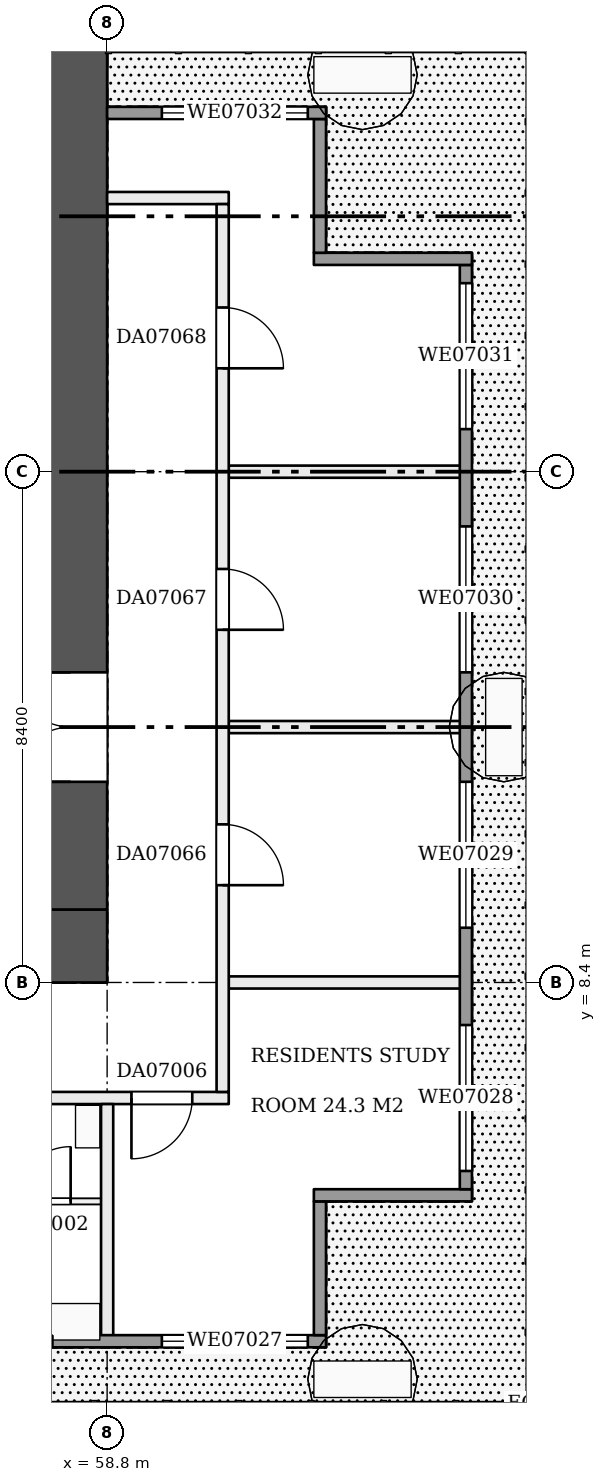
"""IFC4 building model, lengths in metres.
Left out: names, types, materials, properties, quantities, classifications, styles, units other than length and angle.
Written with IfcOpenShell. Run it as: python <this file> out.ifc"""

import sys

from ifc_helpers import new_model, si_unit, direction, frame, frame_2d, origin, place, context, subcontext, project, spatial, rectangle, extrude, element, fill, save


model = new_model("IFC4")
c1 = context("Model", 3, precision=1e-05, world=origin(), true_north=direction((0.0, 1.0)))
c2 = subcontext(c1, "Body", "Model", "MODEL_VIEW")
j1 = project(units=[si_unit("LENGTHUNIT", "METRE"), si_unit("PLANEANGLEUNIT", "RADIAN")], contexts=[c1])
p1 = place(None, origin())
s1 = spatial("IfcSite", under=j1, at=p1, CompositionType="ELEMENT")
p2 = place(p1, origin())
s2 = spatial("IfcBuilding", under=s1, at=p2, CompositionType="ELEMENT")
p3 = place(p2, frame((0.0, 0.0, 35.7)))
s3 = spatial("IfcBuildingStorey", under=s2, at=p3, CompositionType="ELEMENT", Elevation=35.7)
p4 = place(p3, frame((42.0, 9.0, 0.0), z_axis=(0.0, 0.0, 1.0), x_axis=(1.0, 0.0, 0.0)))
e1 = element("IfcWall", 1, at=p4, inside=s3, PredefinedType="SHEAR", context=c2, shape_type="SweptSolid", body=[
    extrude(rectangle(XDim=16.8, YDim=1.2, at=frame_2d((8.4, 0.0))), origin(), (0.0, 0.0, 1.0), 3.22),
])
p5 = place(p4, frame((3.1, 0.0, 0.0)))
e2 = element("IfcOpeningElement", 2, at=p5, cuts=e1, PredefinedType="OPENING", context=c2, shape_type="SweptSolid", body=[
    extrude(rectangle(XDim=1.0, YDim=2.1, at=frame_2d((0.5, 1.05))), frame((0.0, 0.61, 0.0), z_axis=(0.0, -1.0, 0.0), x_axis=(1.0, 0.0, 0.0)), (0.0, 0.0, 1.0), 1.22),
])
p6 = place(p4, frame((12.7, 0.0, 0.0)))
e3 = element("IfcOpeningElement", 3, at=p6, cuts=e1, PredefinedType="OPENING", context=c2, shape_type="SweptSolid", body=[
    extrude(rectangle(XDim=1.0, YDim=2.1, at=frame_2d((0.5, 1.05))), frame((0.0, 0.61, 0.0), z_axis=(0.0, -1.0, 0.0), x_axis=(1.0, 0.0, 0.0)), (0.0, 0.0, 1.0), 1.22),
])
p7 = place(p3, frame((58.2, 9.6, 0.0), z_axis=(0.0, 0.0, 1.0), x_axis=(0.0, 1.0, 0.0)))
e4 = element("IfcWall", 4, at=p7, inside=s3, PredefinedType="SHEAR", context=c2, shape_type="SweptSolid", body=[
    extrude(rectangle(XDim=14.4, YDim=1.2, at=frame_2d((7.2, 0.0))), origin(), (0.0, 0.0, 1.0), 3.22),
])
p8 = place(p7, frame((2.1, 0.0, 0.0)))
e5 = element("IfcOpeningElement", 5, at=p8, cuts=e4, PredefinedType="OPENING", context=c2, shape_type="SweptSolid", body=[
    extrude(rectangle(XDim=1.8, YDim=2.1, at=frame_2d((0.9, 1.05))), frame((0.0, 0.61, 0.0), z_axis=(0.0, -1.0, 0.0), x_axis=(1.0, 0.0, 0.0)), (0.0, 0.0, 1.0), 1.22),
])
p9 = place(p3, frame((54.65, 4.8, 0.0), z_axis=(0.0, 0.0, 1.0), x_axis=(1.0, 0.0, 0.0)))
e6 = element("IfcWall", 6, at=p9, inside=s3, PredefinedType="PARTITIONING", context=c2, shape_type="SweptSolid", body=[
    extrude(rectangle(XDim=4.05, YDim=0.1, at=frame_2d((2.025, 0.0))), origin(), (0.0, 0.0, 1.0), 3.22),
])
p10 = place(p9, frame((0.55, 0.0, 0.0)))
e7 = element("IfcOpeningElement", 7, at=p10, cuts=e6, PredefinedType="OPENING", context=c2, shape_type="SweptSolid", body=[
    extrude(rectangle(XDim=0.9, YDim=2.1, at=frame_2d((0.45, 1.05))), frame((0.0, 0.06, 0.0), z_axis=(0.0, -1.0, 0.0), x_axis=(1.0, 0.0, 0.0)), (0.0, 0.0, 1.0), 0.12),
])
p11 = place(p9, frame((2.65, 0.0, 0.0)))
e8 = element("IfcOpeningElement", 8, at=p11, cuts=e6, PredefinedType="OPENING", context=c2, shape_type="SweptSolid", body=[
    extrude(rectangle(XDim=0.9, YDim=2.1, at=frame_2d((0.45, 1.05))), frame((0.0, 0.06, 0.0), z_axis=(0.0, -1.0, 0.0), x_axis=(1.0, 0.0, 0.0)), (0.0, 0.0, 1.0), 0.12),
])
p12 = place(p3, frame((42.1, 6.5, 0.0), z_axis=(0.0, 0.0, 1.0), x_axis=(1.0, 0.0, 0.0)))
e9 = element("IfcWall", 9, at=p12, inside=s3, PredefinedType="PARTITIONING", context=c2, shape_type="SweptSolid", body=[
    extrude(rectangle(XDim=18.7, YDim=0.2, at=frame_2d((9.35, 0.0))), origin(), (0.0, 0.0, 1.0), 3.22),
])
p13 = place(p12, frame((1.5, 0.0, 0.0)))
e10 = element("IfcOpeningElement", 10, at=p13, cuts=e9, PredefinedType="OPENING", context=c2, shape_type="SweptSolid", body=[
    extrude(rectangle(XDim=1.0, YDim=2.1, at=frame_2d((0.5, 1.05))), frame((0.0, 0.11, 0.0), z_axis=(0.0, -1.0, 0.0), x_axis=(1.0, 0.0, 0.0)), (0.0, 0.0, 1.0), 0.22),
])
p14 = place(p12, frame((5.7, 0.0, 0.0)))
e11 = element("IfcOpeningElement", 11, at=p14, cuts=e9, PredefinedType="OPENING", context=c2, shape_type="SweptSolid", body=[
    extrude(rectangle(XDim=1.0, YDim=2.1, at=frame_2d((0.5, 1.05))), frame((0.0, 0.11, 0.0), z_axis=(0.0, -1.0, 0.0), x_axis=(1.0, 0.0, 0.0)), (0.0, 0.0, 1.0), 0.22),
])
p15 = place(p12, frame((13.1, 0.0, 0.0)))
e12 = element("IfcOpeningElement", 12, at=p15, cuts=e9, PredefinedType="OPENING", context=c2, shape_type="SweptSolid", body=[
    extrude(rectangle(XDim=1.0, YDim=2.1, at=frame_2d((0.5, 1.05))), frame((0.0, 0.11, 0.0), z_axis=(0.0, -1.0, 0.0), x_axis=(1.0, 0.0, 0.0)), (0.0, 0.0, 1.0), 0.22),
])
p16 = place(p12, frame((17.1, 0.0, 0.0)))
e13 = element("IfcOpeningElement", 13, at=p16, cuts=e9, PredefinedType="OPENING", context=c2, shape_type="SweptSolid", body=[
    extrude(rectangle(XDim=1.0, YDim=2.1, at=frame_2d((0.5, 1.05))), frame((0.0, 0.11, 0.0), z_axis=(0.0, -1.0, 0.0), x_axis=(1.0, 0.0, 0.0)), (0.0, 0.0, 1.0), 0.22),
])
for number, where, z_axis, x_axis in (
    (14, (60.8, 8.4, 0.0), (0.0, 0.0, 1.0), (1.0, 0.0, 0.0)),
    (15, (60.8, 12.6, 0.0), (0.0, 0.0, 1.0), (1.0, 0.0, 0.0)),
    (16, (60.8, 16.8, 0.0), (0.0, 0.0, 1.0), (1.0, 0.0, 0.0)),
):
    element("IfcWall", number, at=place(p3, frame(where, z_axis=z_axis, x_axis=x_axis)), inside=s3, PredefinedType="PARTITIONING", context=c2, shape_type="SweptSolid", body=[
        extrude(rectangle(XDim=3.9, YDim=0.2, at=frame_2d((1.95, 0.0))), origin(), (0.0, 0.0, 1.0), 3.22),
    ])
p17 = place(p3, frame((58.8, 21.3, 0.0), z_axis=(0.0, 0.0, 1.0), x_axis=(1.0, 0.0, 0.0)))
e17 = element("IfcWall", 17, at=p17, inside=s3, PredefinedType="PARTITIONING", context=c2, shape_type="SweptSolid", body=[
    extrude(rectangle(XDim=2.0, YDim=0.2, at=frame_2d((1.0, 0.0))), origin(), (0.0, 0.0, 1.0), 3.22),
])
p18 = place(p3, frame((58.8, 2.5, 0.0), z_axis=(0.0, 0.0, 1.0), x_axis=(0.0, 1.0, 0.0)))
e18 = element("IfcWall", 18, at=p18, inside=s3, PredefinedType="PARTITIONING", context=c2, shape_type="SweptSolid", body=[
    extrude(rectangle(XDim=3.9, YDim=0.2, at=frame_2d((1.95, 0.0))), origin(), (0.0, 0.0, 1.0), 3.22),
])
p19 = place(p3, frame((60.7, 6.6, 0.0), z_axis=(0.0, 0.0, 1.0), x_axis=(0.0, 1.0, 0.0)))
e19 = element("IfcWall", 19, at=p19, inside=s3, PredefinedType="PARTITIONING", context=c2, shape_type="SweptSolid", body=[
    extrude(rectangle(XDim=14.6, YDim=0.2, at=frame_2d((7.3, 0.0))), origin(), (0.0, 0.0, 1.0), 3.22),
])
p20 = place(p19, frame((3.4, 0.0, 0.0)))
e20 = element("IfcOpeningElement", 20, at=p20, cuts=e19, PredefinedType="OPENING", context=c2, shape_type="SweptSolid", body=[
    extrude(rectangle(XDim=1.0, YDim=2.1, at=frame_2d((0.5, 1.05))), frame((0.0, 0.11, 0.0), z_axis=(0.0, -1.0, 0.0), x_axis=(1.0, 0.0, 0.0)), (0.0, 0.0, 1.0), 0.22),
])
p21 = place(p19, frame((7.6, 0.0, 0.0)))
e21 = element("IfcOpeningElement", 21, at=p21, cuts=e19, PredefinedType="OPENING", context=c2, shape_type="SweptSolid", body=[
    extrude(rectangle(XDim=1.0, YDim=2.1, at=frame_2d((0.5, 1.05))), frame((0.0, 0.11, 0.0), z_axis=(0.0, -1.0, 0.0), x_axis=(1.0, 0.0, 0.0)), (0.0, 0.0, 1.0), 0.22),
])
p22 = place(p19, frame((11.9, 0.0, 0.0)))
e22 = element("IfcOpeningElement", 22, at=p22, cuts=e19, PredefinedType="OPENING", context=c2, shape_type="SweptSolid", body=[
    extrude(rectangle(XDim=1.0, YDim=2.1, at=frame_2d((0.5, 1.05))), frame((0.0, 0.11, 0.0), z_axis=(0.0, -1.0, 0.0), x_axis=(1.0, 0.0, 0.0)), (0.0, 0.0, 1.0), 0.22),
])
p23 = place(p3, frame((4.8, 2.5, 0.0), z_axis=(0.0, 0.0, 1.0), x_axis=(1.0, 0.0, 0.0)))
e23 = element("IfcWall", 23, at=p23, inside=s3, PredefinedType="SOLIDWALL", context=c2, shape_type="SweptSolid", body=[
    extrude(rectangle(XDim=57.6, YDim=0.2, at=frame_2d((28.8, 0.0))), origin(), (0.0, 0.0, 1.0), 3.22),
])
p24 = place(p23, frame((0.3, 0.0, 0.0)))
e24 = element("IfcOpeningElement", 24, at=p24, cuts=e23, PredefinedType="OPENING", context=c2, shape_type="SweptSolid", body=[
    extrude(rectangle(XDim=2.4, YDim=2.2, at=frame_2d((1.2, 1.1))), frame((0.0, 0.11, 0.0), z_axis=(0.0, -1.0, 0.0), x_axis=(1.0, 0.0, 0.0)), (0.0, 0.0, 1.0), 0.22),
])
p25 = place(p23, frame((4.5, 0.0, 0.9)))
e25 = element("IfcOpeningElement", 25, at=p25, cuts=e23, PredefinedType="OPENING", context=c2, shape_type="SweptSolid", body=[
    extrude(rectangle(XDim=2.4, YDim=1.5, at=frame_2d((1.2, 0.75))), frame((0.0, 0.11, 0.0), z_axis=(0.0, -1.0, 0.0), x_axis=(1.0, 0.0, 0.0)), (0.0, 0.0, 1.0), 0.22),
])
p26 = place(p23, frame((8.7, 0.0, 0.9)))
e26 = element("IfcOpeningElement", 26, at=p26, cuts=e23, PredefinedType="OPENING", context=c2, shape_type="SweptSolid", body=[
    extrude(rectangle(XDim=2.4, YDim=1.5, at=frame_2d((1.2, 0.75))), frame((0.0, 0.11, 0.0), z_axis=(0.0, -1.0, 0.0), x_axis=(1.0, 0.0, 0.0)), (0.0, 0.0, 1.0), 0.22),
])
p27 = place(p23, frame((12.9, 0.0, 0.9)))
e27 = element("IfcOpeningElement", 27, at=p27, cuts=e23, PredefinedType="OPENING", context=c2, shape_type="SweptSolid", body=[
    extrude(rectangle(XDim=2.4, YDim=1.5, at=frame_2d((1.2, 0.75))), frame((0.0, 0.11, 0.0), z_axis=(0.0, -1.0, 0.0), x_axis=(1.0, 0.0, 0.0)), (0.0, 0.0, 1.0), 0.22),
])
p28 = place(p23, frame((17.1, 0.0, 0.0)))
e28 = element("IfcOpeningElement", 28, at=p28, cuts=e23, PredefinedType="OPENING", context=c2, shape_type="SweptSolid", body=[
    extrude(rectangle(XDim=2.4, YDim=2.2, at=frame_2d((1.2, 1.1))), frame((0.0, 0.11, 0.0), z_axis=(0.0, -1.0, 0.0), x_axis=(1.0, 0.0, 0.0)), (0.0, 0.0, 1.0), 0.22),
])
p29 = place(p23, frame((21.3, 0.0, 0.0)))
e29 = element("IfcOpeningElement", 29, at=p29, cuts=e23, PredefinedType="OPENING", context=c2, shape_type="SweptSolid", body=[
    extrude(rectangle(XDim=2.4, YDim=2.2, at=frame_2d((1.2, 1.1))), frame((0.0, 0.11, 0.0), z_axis=(0.0, -1.0, 0.0), x_axis=(1.0, 0.0, 0.0)), (0.0, 0.0, 1.0), 0.22),
])
p30 = place(p23, frame((25.5, 0.0, 0.9)))
e30 = element("IfcOpeningElement", 30, at=p30, cuts=e23, PredefinedType="OPENING", context=c2, shape_type="SweptSolid", body=[
    extrude(rectangle(XDim=2.4, YDim=1.5, at=frame_2d((1.2, 0.75))), frame((0.0, 0.11, 0.0), z_axis=(0.0, -1.0, 0.0), x_axis=(1.0, 0.0, 0.0)), (0.0, 0.0, 1.0), 0.22),
])
p31 = place(p23, frame((29.7, 0.0, 0.0)))
e31 = element("IfcOpeningElement", 31, at=p31, cuts=e23, PredefinedType="OPENING", context=c2, shape_type="SweptSolid", body=[
    extrude(rectangle(XDim=2.4, YDim=2.2, at=frame_2d((1.2, 1.1))), frame((0.0, 0.11, 0.0), z_axis=(0.0, -1.0, 0.0), x_axis=(1.0, 0.0, 0.0)), (0.0, 0.0, 1.0), 0.22),
])
p32 = place(p23, frame((33.9, 0.0, 0.9)))
e32 = element("IfcOpeningElement", 32, at=p32, cuts=e23, PredefinedType="OPENING", context=c2, shape_type="SweptSolid", body=[
    extrude(rectangle(XDim=2.4, YDim=1.5, at=frame_2d((1.2, 0.75))), frame((0.0, 0.11, 0.0), z_axis=(0.0, -1.0, 0.0), x_axis=(1.0, 0.0, 0.0)), (0.0, 0.0, 1.0), 0.22),
])
p33 = place(p23, frame((38.1, 0.0, 0.9)))
e33 = element("IfcOpeningElement", 33, at=p33, cuts=e23, PredefinedType="OPENING", context=c2, shape_type="SweptSolid", body=[
    extrude(rectangle(XDim=2.4, YDim=1.5, at=frame_2d((1.2, 0.75))), frame((0.0, 0.11, 0.0), z_axis=(0.0, -1.0, 0.0), x_axis=(1.0, 0.0, 0.0)), (0.0, 0.0, 1.0), 0.22),
])
p34 = place(p23, frame((42.3, 0.0, 0.9)))
e34 = element("IfcOpeningElement", 34, at=p34, cuts=e23, PredefinedType="OPENING", context=c2, shape_type="SweptSolid", body=[
    extrude(rectangle(XDim=2.4, YDim=1.5, at=frame_2d((1.2, 0.75))), frame((0.0, 0.11, 0.0), z_axis=(0.0, -1.0, 0.0), x_axis=(1.0, 0.0, 0.0)), (0.0, 0.0, 1.0), 0.22),
])
p35 = place(p23, frame((46.5, 0.0, 0.0)))
e35 = element("IfcOpeningElement", 35, at=p35, cuts=e23, PredefinedType="OPENING", context=c2, shape_type="SweptSolid", body=[
    extrude(rectangle(XDim=2.4, YDim=2.2, at=frame_2d((1.2, 1.1))), frame((0.0, 0.11, 0.0), z_axis=(0.0, -1.0, 0.0), x_axis=(1.0, 0.0, 0.0)), (0.0, 0.0, 1.0), 0.22),
])
p36 = place(p23, frame((50.7, 0.0, 0.9)))
e36 = element("IfcOpeningElement", 36, at=p36, cuts=e23, PredefinedType="OPENING", context=c2, shape_type="SweptSolid", body=[
    extrude(rectangle(XDim=2.4, YDim=1.5, at=frame_2d((1.2, 0.75))), frame((0.0, 0.11, 0.0), z_axis=(0.0, -1.0, 0.0), x_axis=(1.0, 0.0, 0.0)), (0.0, 0.0, 1.0), 0.22),
])
p37 = place(p23, frame((54.9, 0.0, 0.9)))
e37 = element("IfcOpeningElement", 37, at=p37, cuts=e23, PredefinedType="OPENING", context=c2, shape_type="SweptSolid", body=[
    extrude(rectangle(XDim=2.4, YDim=1.5, at=frame_2d((1.2, 0.75))), frame((0.0, 0.11, 0.0), z_axis=(0.0, -1.0, 0.0), x_axis=(1.0, 0.0, 0.0)), (0.0, 0.0, 1.0), 0.22),
])
p38 = place(p3, frame((62.3, 2.6, 0.0), z_axis=(0.0, 0.0, 1.0), x_axis=(0.0, 1.0, 0.0)))
e38 = element("IfcWall", 38, at=p38, inside=s3, PredefinedType="SOLIDWALL", context=c2, shape_type="SweptSolid", body=[
    extrude(rectangle(XDim=2.2, YDim=0.2, at=frame_2d((1.1, 0.0))), origin(), (0.0, 0.0, 1.0), 3.22),
])
p39 = place(p3, frame((62.2, 4.9, 0.0), z_axis=(0.0, 0.0, 1.0), x_axis=(1.0, 0.0, 0.0)))
e39 = element("IfcWall", 39, at=p39, inside=s3, PredefinedType="SOLIDWALL", context=c2, shape_type="SweptSolid", body=[
    extrude(rectangle(XDim=2.6, YDim=0.2, at=frame_2d((1.3, 0.0))), origin(), (0.0, 0.0, 1.0), 3.22),
])
p40 = place(p3, frame((64.7, 5.0, 0.0), z_axis=(0.0, 0.0, 1.0), x_axis=(0.0, 1.0, 0.0)))
e40 = element("IfcWall", 40, at=p40, inside=s3, PredefinedType="SOLIDWALL", context=c2, shape_type="SweptSolid", body=[
    extrude(rectangle(XDim=15.2, YDim=0.2, at=frame_2d((7.6, 0.0))), origin(), (0.0, 0.0, 1.0), 3.22),
])
p41 = place(p40, frame((0.3, 0.0, 0.9)))
e41 = element("IfcOpeningElement", 41, at=p41, cuts=e40, PredefinedType="OPENING", context=c2, shape_type="SweptSolid", body=[
    extrude(rectangle(XDim=2.4, YDim=1.5, at=frame_2d((1.2, 0.75))), frame((0.0, 0.11, 0.0), z_axis=(0.0, -1.0, 0.0), x_axis=(1.0, 0.0, 0.0)), (0.0, 0.0, 1.0), 0.22),
])
p42 = place(p40, frame((4.3, 0.0, 0.9)))
e42 = element("IfcOpeningElement", 42, at=p42, cuts=e40, PredefinedType="OPENING", context=c2, shape_type="SweptSolid", body=[
    extrude(rectangle(XDim=2.4, YDim=1.5, at=frame_2d((1.2, 0.75))), frame((0.0, 0.11, 0.0), z_axis=(0.0, -1.0, 0.0), x_axis=(1.0, 0.0, 0.0)), (0.0, 0.0, 1.0), 0.22),
])
p43 = place(p40, frame((8.5, 0.0, 0.9)))
e43 = element("IfcOpeningElement", 43, at=p43, cuts=e40, PredefinedType="OPENING", context=c2, shape_type="SweptSolid", body=[
    extrude(rectangle(XDim=2.4, YDim=1.5, at=frame_2d((1.2, 0.75))), frame((0.0, 0.11, 0.0), z_axis=(0.0, -1.0, 0.0), x_axis=(1.0, 0.0, 0.0)), (0.0, 0.0, 1.0), 0.22),
])
p44 = place(p40, frame((12.5, 0.0, 0.9)))
e44 = element("IfcOpeningElement", 44, at=p44, cuts=e40, PredefinedType="OPENING", context=c2, shape_type="SweptSolid", body=[
    extrude(rectangle(XDim=2.4, YDim=1.5, at=frame_2d((1.2, 0.75))), frame((0.0, 0.11, 0.0), z_axis=(0.0, -1.0, 0.0), x_axis=(1.0, 0.0, 0.0)), (0.0, 0.0, 1.0), 0.22),
])
p45 = place(p3, frame((64.8, 20.3, 0.0), z_axis=(0.0, 0.0, 1.0), x_axis=(-1.0, 0.0, 0.0)))
e45 = element("IfcWall", 45, at=p45, inside=s3, PredefinedType="SOLIDWALL", context=c2, shape_type="SweptSolid", body=[
    extrude(rectangle(XDim=2.6, YDim=0.2, at=frame_2d((1.3, 0.0))), origin(), (0.0, 0.0, 1.0), 3.22),
])
p46 = place(p3, frame((62.3, 20.4, 0.0), z_axis=(0.0, 0.0, 1.0), x_axis=(0.0, 1.0, 0.0)))
e46 = element("IfcWall", 46, at=p46, inside=s3, PredefinedType="SOLIDWALL", context=c2, shape_type="SweptSolid", body=[
    extrude(rectangle(XDim=2.2, YDim=0.2, at=frame_2d((1.1, 0.0))), origin(), (0.0, 0.0, 1.0), 3.22),
])
p47 = place(p3, frame((62.4, 22.7, 0.0), z_axis=(0.0, 0.0, 1.0), x_axis=(-1.0, 0.0, 0.0)))
e47 = element("IfcWall", 47, at=p47, inside=s3, PredefinedType="SOLIDWALL", context=c2, shape_type="SweptSolid", body=[
    extrude(rectangle(XDim=3.6, YDim=0.2, at=frame_2d((1.8, 0.0))), origin(), (0.0, 0.0, 1.0), 3.22),
])
p48 = place(p47, frame((0.3, 0.0, 0.9)))
e48 = element("IfcOpeningElement", 48, at=p48, cuts=e47, PredefinedType="OPENING", context=c2, shape_type="SweptSolid", body=[
    extrude(rectangle(XDim=2.4, YDim=1.5, at=frame_2d((1.2, 0.75))), frame((0.0, 0.11, 0.0), z_axis=(0.0, -1.0, 0.0), x_axis=(1.0, 0.0, 0.0)), (0.0, 0.0, 1.0), 0.22),
])
p49 = place(p8, origin())
e49 = element("IfcDoor", 49, at=p49, inside=s3, OperationType="DOUBLE_DOOR_SINGLE_SWING", PredefinedType="DOOR", context=c2, shape_type="SweptSolid", body=[
    extrude(rectangle(XDim=1.8, YDim=2.1, at=frame_2d((0.9, 1.05))), frame((0.0, 0.025, 0.0), z_axis=(0.0, -1.0, 0.0), x_axis=(1.0, 0.0, 0.0)), (0.0, 0.0, 1.0), 0.05),
])
fill(e5, e49)
p50 = place(p11, origin())
e50 = element("IfcDoor", 50, at=p50, inside=s3, OperationType="SINGLE_SWING_RIGHT", PredefinedType="DOOR", context=c2, shape_type="SweptSolid", body=[
    extrude(rectangle(XDim=0.9, YDim=2.1, at=frame_2d((0.45, 1.05))), frame((0.0, 0.025, 0.0), z_axis=(0.0, -1.0, 0.0), x_axis=(1.0, 0.0, 0.0)), (0.0, 0.0, 1.0), 0.05),
])
fill(e8, e50)
p51 = place(p16, frame((1.0, 0.0, 0.0), z_axis=(0.0, 0.0, 1.0), x_axis=(-1.0, 0.0, 0.0)))
e51 = element("IfcDoor", 51, at=p51, inside=s3, OperationType="SINGLE_SWING_RIGHT", PredefinedType="DOOR", context=c2, shape_type="SweptSolid", body=[
    extrude(rectangle(XDim=1.0, YDim=2.1, at=frame_2d((0.5, 1.05))), frame((0.0, 0.025, 0.0), z_axis=(0.0, -1.0, 0.0), x_axis=(1.0, 0.0, 0.0)), (0.0, 0.0, 1.0), 0.05),
])
fill(e13, e51)
p52 = place(p20, frame((1.0, 0.0, 0.0), z_axis=(0.0, 0.0, 1.0), x_axis=(-1.0, 0.0, 0.0)))
e52 = element("IfcDoor", 52, at=p52, inside=s3, OperationType="SINGLE_SWING_RIGHT", PredefinedType="DOOR", context=c2, shape_type="SweptSolid", body=[
    extrude(rectangle(XDim=1.0, YDim=2.1, at=frame_2d((0.5, 1.05))), frame((0.0, 0.025, 0.0), z_axis=(0.0, -1.0, 0.0), x_axis=(1.0, 0.0, 0.0)), (0.0, 0.0, 1.0), 0.05),
])
fill(e20, e52)
p53 = place(p21, frame((1.0, 0.0, 0.0), z_axis=(0.0, 0.0, 1.0), x_axis=(-1.0, 0.0, 0.0)))
e53 = element("IfcDoor", 53, at=p53, inside=s3, OperationType="SINGLE_SWING_RIGHT", PredefinedType="DOOR", context=c2, shape_type="SweptSolid", body=[
    extrude(rectangle(XDim=1.0, YDim=2.1, at=frame_2d((0.5, 1.05))), frame((0.0, 0.025, 0.0), z_axis=(0.0, -1.0, 0.0), x_axis=(1.0, 0.0, 0.0)), (0.0, 0.0, 1.0), 0.05),
])
fill(e21, e53)
p54 = place(p22, frame((1.0, 0.0, 0.0), z_axis=(0.0, 0.0, 1.0), x_axis=(-1.0, 0.0, 0.0)))
e54 = element("IfcDoor", 54, at=p54, inside=s3, OperationType="SINGLE_SWING_RIGHT", PredefinedType="DOOR", context=c2, shape_type="SweptSolid", body=[
    extrude(rectangle(XDim=1.0, YDim=2.1, at=frame_2d((0.5, 1.05))), frame((0.0, 0.025, 0.0), z_axis=(0.0, -1.0, 0.0), x_axis=(1.0, 0.0, 0.0)), (0.0, 0.0, 1.0), 0.05),
])
fill(e22, e54)
p55 = place(p37, origin())
e55 = element("IfcWindow", 55, at=p55, inside=s3, PartitioningType="SINGLE_PANEL", PredefinedType="WINDOW", context=c2, shape_type="SweptSolid", body=[
    extrude(rectangle(XDim=2.4, YDim=1.5, at=frame_2d((1.2, 0.75))), frame((0.0, 0.03, 0.0), z_axis=(0.0, -1.0, 0.0), x_axis=(1.0, 0.0, 0.0)), (0.0, 0.0, 1.0), 0.06),
])
fill(e37, e55)
p56 = place(p41, origin())
e56 = element("IfcWindow", 56, at=p56, inside=s3, PartitioningType="SINGLE_PANEL", PredefinedType="WINDOW", context=c2, shape_type="SweptSolid", body=[
    extrude(rectangle(XDim=2.4, YDim=1.5, at=frame_2d((1.2, 0.75))), frame((0.0, 0.03, 0.0), z_axis=(0.0, -1.0, 0.0), x_axis=(1.0, 0.0, 0.0)), (0.0, 0.0, 1.0), 0.06),
])
fill(e41, e56)
p57 = place(p42, origin())
e57 = element("IfcWindow", 57, at=p57, inside=s3, PartitioningType="SINGLE_PANEL", PredefinedType="WINDOW", context=c2, shape_type="SweptSolid", body=[
    extrude(rectangle(XDim=2.4, YDim=1.5, at=frame_2d((1.2, 0.75))), frame((0.0, 0.03, 0.0), z_axis=(0.0, -1.0, 0.0), x_axis=(1.0, 0.0, 0.0)), (0.0, 0.0, 1.0), 0.06),
])
fill(e42, e57)
p58 = place(p43, origin())
e58 = element("IfcWindow", 58, at=p58, inside=s3, PartitioningType="SINGLE_PANEL", PredefinedType="WINDOW", context=c2, shape_type="SweptSolid", body=[
    extrude(rectangle(XDim=2.4, YDim=1.5, at=frame_2d((1.2, 0.75))), frame((0.0, 0.03, 0.0), z_axis=(0.0, -1.0, 0.0), x_axis=(1.0, 0.0, 0.0)), (0.0, 0.0, 1.0), 0.06),
])
fill(e43, e58)
p59 = place(p44, origin())
e59 = element("IfcWindow", 59, at=p59, inside=s3, PartitioningType="SINGLE_PANEL", PredefinedType="WINDOW", context=c2, shape_type="SweptSolid", body=[
    extrude(rectangle(XDim=2.4, YDim=1.5, at=frame_2d((1.2, 0.75))), frame((0.0, 0.03, 0.0), z_axis=(0.0, -1.0, 0.0), x_axis=(1.0, 0.0, 0.0)), (0.0, 0.0, 1.0), 0.06),
])
fill(e44, e59)
p60 = place(p48, origin())
e60 = element("IfcWindow", 60, at=p60, inside=s3, PartitioningType="SINGLE_PANEL", PredefinedType="WINDOW", context=c2, shape_type="SweptSolid", body=[
    extrude(rectangle(XDim=2.4, YDim=1.5, at=frame_2d((1.2, 0.75))), frame((0.0, 0.03, 0.0), z_axis=(0.0, -1.0, 0.0), x_axis=(1.0, 0.0, 0.0)), (0.0, 0.0, 1.0), 0.06),
])
fill(e48, e60)
save(model, sys.argv[1])
